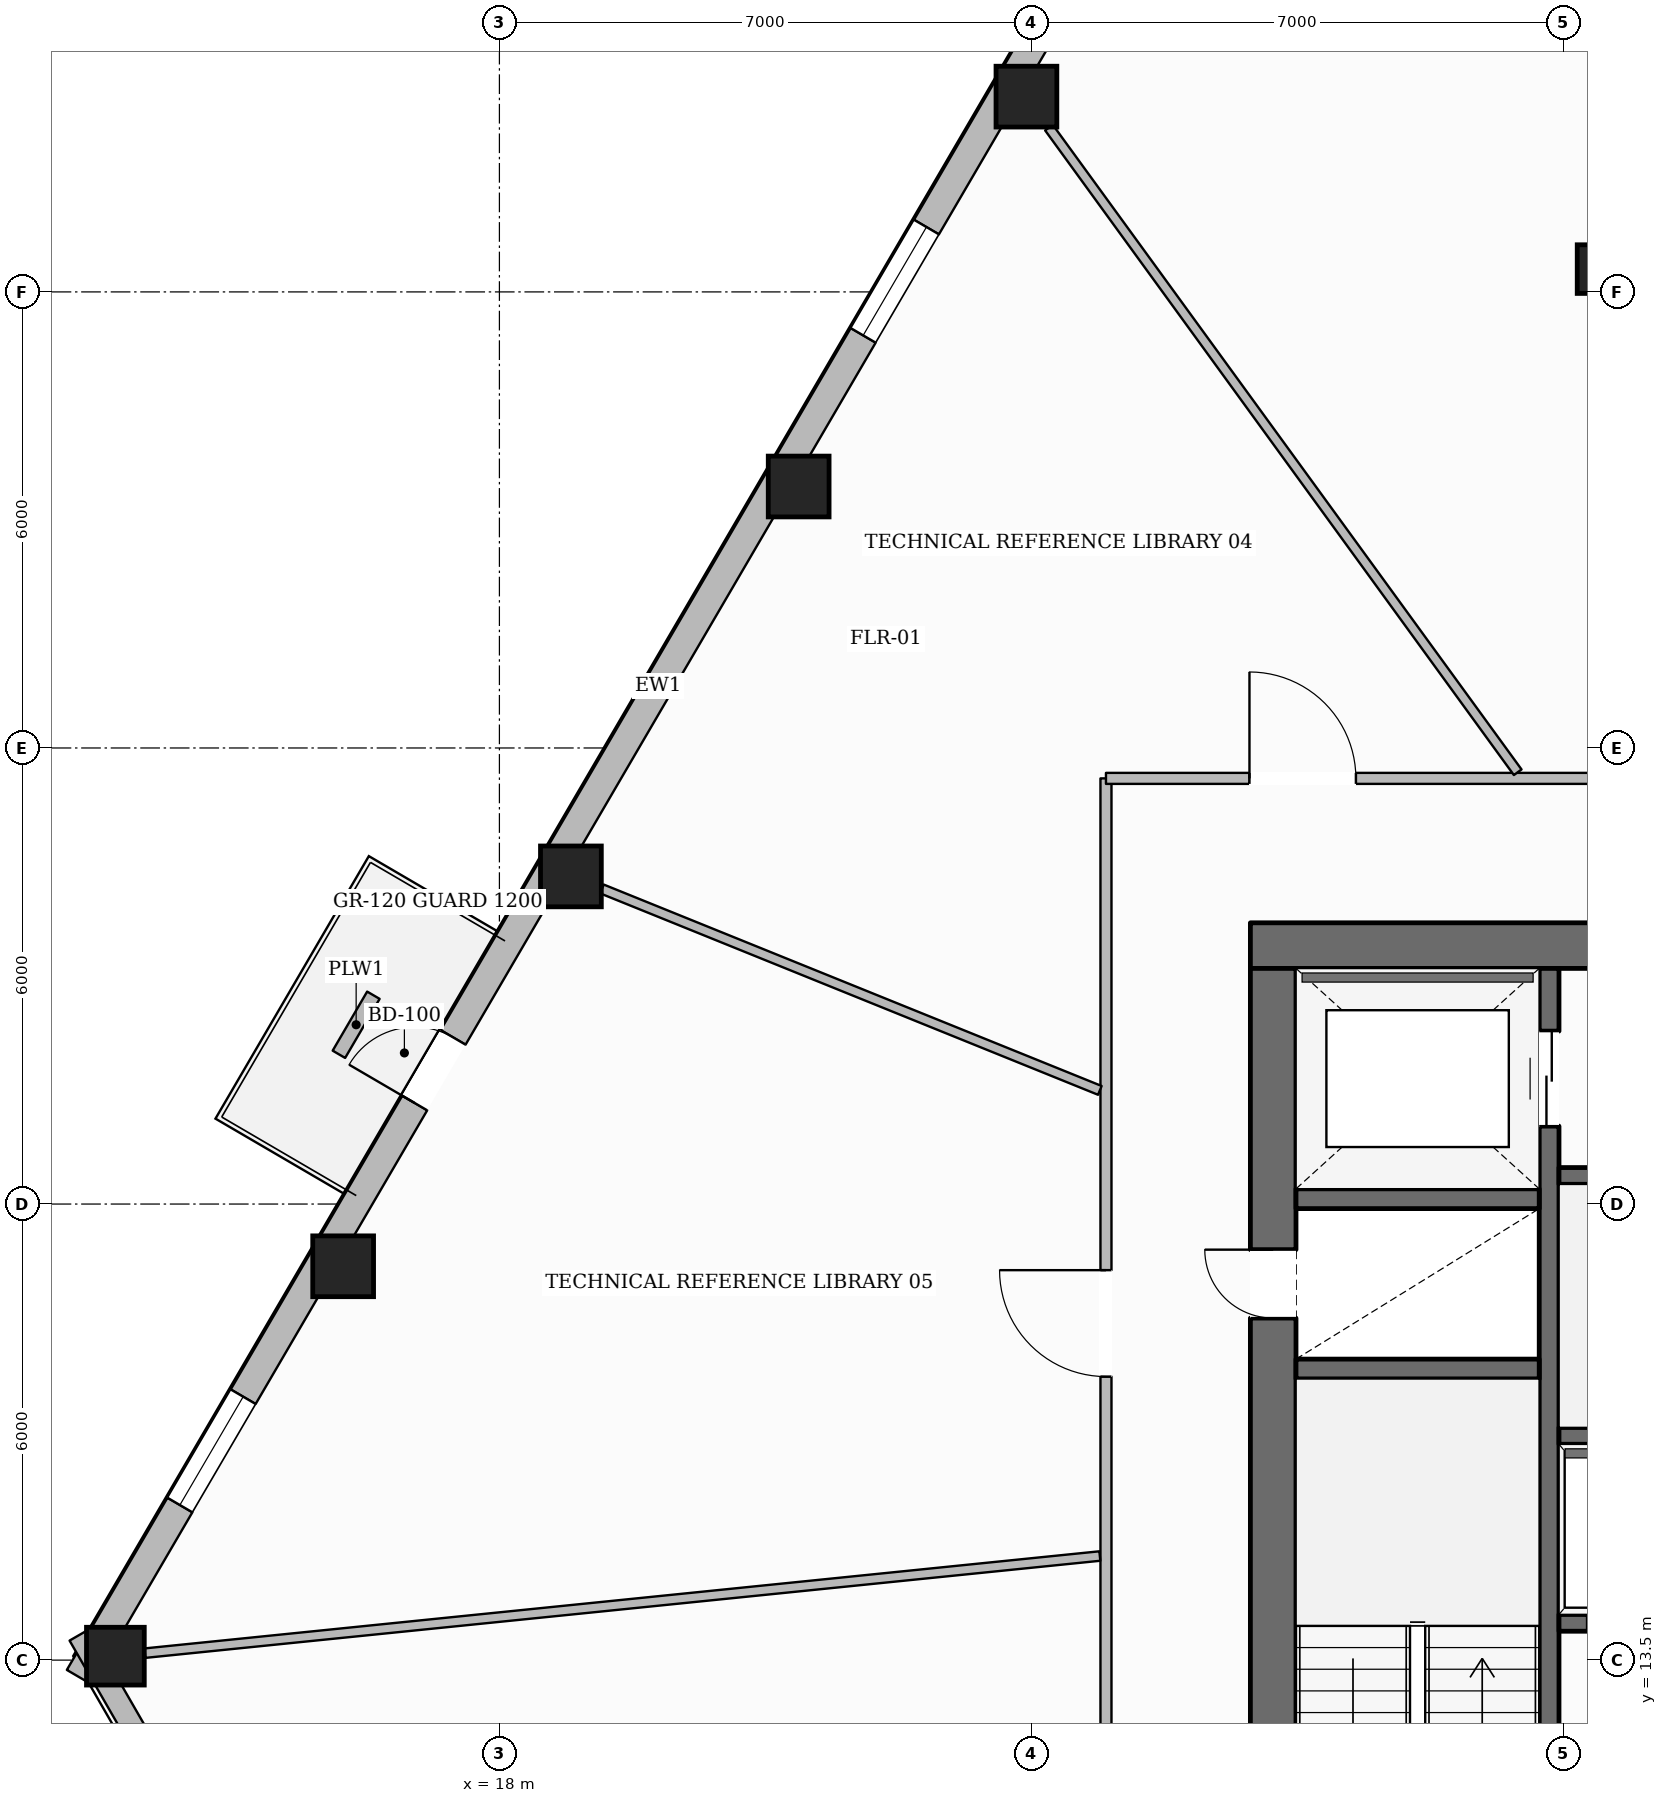
"""IFC4 building model, lengths in metres.
Left out: names, types, materials, properties, quantities, classifications, styles, units other than length and angle.
Written with IfcOpenShell. Run it as: python <this file> out.ifc"""

import sys

from ifc_helpers import new_model, si_unit, direction, frame, frame_2d, origin, origin_2d, place, context, subcontext, project, spatial, rectangle, hollow_rectangle, extrude, element, fill, save


model = new_model("IFC4")
c1 = context("Model", 3, precision=1e-05, world=origin(), true_north=direction((0.0, 1.0)))
c2 = subcontext(c1, "Body", "Model", "MODEL_VIEW")
j1 = project(units=[si_unit("LENGTHUNIT", "METRE"), si_unit("PLANEANGLEUNIT", "RADIAN")], contexts=[c1])
p1 = place(None, origin())
s1 = spatial("IfcSite", under=j1, at=p1, CompositionType="ELEMENT")
p2 = place(p1, origin())
s2 = spatial("IfcBuilding", under=s1, at=p2, CompositionType="ELEMENT")
p3 = place(p2, frame((0.0, 0.0, 71.45)))
s3 = spatial("IfcBuildingStorey", under=s2, at=p3, CompositionType="ELEMENT", Elevation=71.45)
p4 = place(p3, frame((27.88, 22.9, 0.0), z_axis=(0.0, 0.0, 1.0), x_axis=(1.0, 0.0, 0.0)))
e1 = element("IfcWall", 1, at=p4, inside=s3, PredefinedType="SOLIDWALL", context=c2, shape_type="SweptSolid", body=[
    extrude(rectangle(XDim=20.24, YDim=0.6, at=frame_2d((10.12, 0.0))), origin(), (0.0, 0.0, 1.0), 3.43),
])
p5 = place(p4, frame((6.395, 0.0, 0.0)))
e2 = element("IfcOpeningElement", 2, at=p5, cuts=e1, PredefinedType="OPENING", context=c2, shape_type="SweptSolid", body=[
    extrude(rectangle(XDim=1.05, YDim=2.15, at=frame_2d((0.525, 1.075))), frame((0.0, 0.31, 0.0), z_axis=(0.0, -1.0, 0.0), x_axis=(1.0, 0.0, 0.0)), (0.0, 0.0, 1.0), 0.62),
])
p6 = place(p4, frame((12.795, 0.0, 0.0)))
e3 = element("IfcOpeningElement", 3, at=p6, cuts=e1, PredefinedType="OPENING", context=c2, shape_type="SweptSolid", body=[
    extrude(rectangle(XDim=1.05, YDim=2.15, at=frame_2d((0.525, 1.075))), frame((0.0, 0.31, 0.0), z_axis=(0.0, -1.0, 0.0), x_axis=(1.0, 0.0, 0.0)), (0.0, 0.0, 1.0), 0.62),
])
p7 = place(p3, frame((28.18, 9.6, 0.0), z_axis=(0.0, 0.0, 1.0), x_axis=(0.0, 1.0, 0.0)))
e4 = element("IfcWall", 4, at=p7, inside=s3, PredefinedType="SOLIDWALL", context=c2, shape_type="SweptSolid", body=[
    extrude(rectangle(XDim=13.0, YDim=0.6, at=frame_2d((6.5, 0.0))), origin(), (0.0, 0.0, 1.0), 3.43),
])
p8 = place(p7, frame((0.2, 0.0, 0.0)))
e5 = element("IfcOpeningElement", 5, at=p8, cuts=e4, PredefinedType="OPENING", context=c2, shape_type="SweptSolid", body=[
    extrude(rectangle(XDim=1.1, YDim=2.15, at=frame_2d((0.55, 1.075))), frame((0.0, 0.31, 0.0), z_axis=(0.0, -1.0, 0.0), x_axis=(1.0, 0.0, 0.0)), (0.0, 0.0, 1.0), 0.62),
])
p9 = place(p7, frame((8.4, 0.0, 0.0)))
e6 = element("IfcOpeningElement", 6, at=p9, cuts=e4, PredefinedType="OPENING", context=c2, shape_type="SweptSolid", body=[
    extrude(rectangle(XDim=0.9, YDim=2.1, at=frame_2d((0.45, 1.05))), frame((0.0, 0.31, 0.0), z_axis=(0.0, -1.0, 0.0), x_axis=(1.0, 0.0, 0.0)), (0.0, 0.0, 1.0), 0.62),
])
p10 = place(p3, frame((31.81, 9.6, 0.0), z_axis=(0.0, 0.0, 1.0), x_axis=(0.0, 1.0, 0.0)))
e7 = element("IfcWall", 7, at=p10, inside=s3, PredefinedType="SHEAR", context=c2, shape_type="SweptSolid", body=[
    extrude(rectangle(XDim=13.0, YDim=0.26, at=frame_2d((6.5, 0.0))), origin(), (0.0, 0.0, 1.0), 3.43),
])
p11 = place(p10, frame((10.925, 0.0, 0.0)))
e8 = element("IfcOpeningElement", 8, at=p11, cuts=e7, PredefinedType="OPENING", context=c2, shape_type="SweptSolid", body=[
    extrude(rectangle(XDim=1.25, YDim=2.25, at=frame_2d((0.625, 1.125))), frame((0.0, 0.14, 0.0), z_axis=(0.0, -1.0, 0.0), x_axis=(1.0, 0.0, 0.0)), (0.0, 0.0, 1.0), 0.28),
])
for number, where, z_axis, x_axis in (
    (9, (28.48, 17.33, 0.0), (0.0, 0.0, 1.0), (1.0, 0.0, 0.0)),
    (10, (28.48, 19.57, 0.0), (0.0, 0.0, 1.0), (1.0, 0.0, 0.0)),
):
    element("IfcWall", number, at=place(p3, frame(where, z_axis=z_axis, x_axis=x_axis)), inside=s3, PredefinedType="SHEAR", context=c2, shape_type="SweptSolid", body=[
        extrude(rectangle(XDim=3.2, YDim=0.26, at=frame_2d((1.6, 0.0))), origin(), (0.0, 0.0, 1.0), 3.43),
    ])
p12 = place(p3, frame((31.94, 19.87, 0.0), z_axis=(0.0, 0.0, 1.0), x_axis=(1.0, 0.0, 0.0)))
e11 = element("IfcWall", 11, at=p12, inside=s3, PredefinedType="SOLIDWALL", context=c2, shape_type="SweptSolid", body=[
    extrude(rectangle(XDim=12.12, YDim=0.22, at=frame_2d((6.06, 0.0))), origin(), (0.0, 0.0, 1.0), 3.43),
])
p13 = place(p12, frame((6.3, 0.0, 0.0)))
e12 = element("IfcOpeningElement", 12, at=p13, cuts=e11, PredefinedType="OPENING", context=c2, shape_type="SweptSolid", body=[
    extrude(rectangle(XDim=1.1, YDim=2.15, at=frame_2d((0.55, 1.075))), frame((0.0, 0.12, 0.0), z_axis=(0.0, -1.0, 0.0), x_axis=(1.0, 0.0, 0.0)), (0.0, 0.0, 1.0), 0.24),
])
p14 = place(p12, frame((8.61, 0.0, 0.0)))
e13 = element("IfcOpeningElement", 13, at=p14, cuts=e11, PredefinedType="OPENING", context=c2, shape_type="SweptSolid", body=[
    extrude(rectangle(XDim=0.9, YDim=2.1, at=frame_2d((0.45, 1.05))), frame((0.0, 0.12, 0.0), z_axis=(0.0, -1.0, 0.0), x_axis=(1.0, 0.0, 0.0)), (0.0, 0.0, 1.0), 0.24),
])
p15 = place(p12, frame((10.85, 0.0, 0.0)))
e14 = element("IfcOpeningElement", 14, at=p15, cuts=e11, PredefinedType="OPENING", context=c2, shape_type="SweptSolid", body=[
    extrude(rectangle(XDim=0.9, YDim=2.1, at=frame_2d((0.45, 1.05))), frame((0.0, 0.12, 0.0), z_axis=(0.0, -1.0, 0.0), x_axis=(1.0, 0.0, 0.0)), (0.0, 0.0, 1.0), 0.24),
])
p16 = place(p3, frame((31.94, 16.45, 0.0), z_axis=(0.0, 0.0, 1.0), x_axis=(1.0, 0.0, 0.0)))
e15 = element("IfcWall", 15, at=p16, inside=s3, PredefinedType="SOLIDWALL", context=c2, shape_type="SweptSolid", body=[
    extrude(rectangle(XDim=12.12, YDim=0.22, at=frame_2d((6.06, 0.0))), origin(), (0.0, 0.0, 1.0), 3.43),
])
p17 = place(p3, frame((31.94, 13.99, 0.0), z_axis=(0.0, 0.0, 1.0), x_axis=(1.0, 0.0, 0.0)))
e16 = element("IfcWall", 16, at=p17, inside=s3, PredefinedType="SOLIDWALL", context=c2, shape_type="SweptSolid", body=[
    extrude(rectangle(XDim=12.12, YDim=0.22, at=frame_2d((6.06, 0.0))), origin(), (0.0, 0.0, 1.0), 3.43),
])
p18 = place(p17, frame((0.385, 0.0, 0.0)))
e17 = element("IfcOpeningElement", 17, at=p18, cuts=e16, PredefinedType="OPENING", context=c2, shape_type="SweptSolid", body=[
    extrude(rectangle(XDim=1.1, YDim=2.2, at=frame_2d((0.55, 1.1))), frame((0.0, 0.12, 0.0), z_axis=(0.0, -1.0, 0.0), x_axis=(1.0, 0.0, 0.0)), (0.0, 0.0, 1.0), 0.24),
])
p19 = place(p17, frame((2.435, 0.0, 0.0)))
e18 = element("IfcOpeningElement", 18, at=p19, cuts=e16, PredefinedType="OPENING", context=c2, shape_type="SweptSolid", body=[
    extrude(rectangle(XDim=1.1, YDim=2.2, at=frame_2d((0.55, 1.1))), frame((0.0, 0.12, 0.0), z_axis=(0.0, -1.0, 0.0), x_axis=(1.0, 0.0, 0.0)), (0.0, 0.0, 1.0), 0.24),
])
p20 = place(p17, frame((4.485, 0.0, 0.0)))
e19 = element("IfcOpeningElement", 19, at=p20, cuts=e16, PredefinedType="OPENING", context=c2, shape_type="SweptSolid", body=[
    extrude(rectangle(XDim=1.1, YDim=2.2, at=frame_2d((0.55, 1.1))), frame((0.0, 0.12, 0.0), z_axis=(0.0, -1.0, 0.0), x_axis=(1.0, 0.0, 0.0)), (0.0, 0.0, 1.0), 0.24),
])
for number, where, z_axis, x_axis in (
    (20, (24.934, 34.069, 0.0), (0.0, 0.0, 1.0), (1.0, 0.0, 0.0)),
    (21, (21.937, 28.94, 0.0), (0.0, 0.0, 1.0), (1.0, 0.0, 0.0)),
    (22, (18.941, 23.811, 0.0), (0.0, 0.0, 1.0), (1.0, 0.0, 0.0)),
    (23, (15.944, 18.681, 0.0), (0.0, 0.0, 1.0), (1.0, 0.0, 0.0)),
):
    element("IfcColumn", number, at=place(p3, frame(where, z_axis=z_axis, x_axis=x_axis)), inside=s3, PredefinedType="COLUMN", context=c2, shape_type="SweptSolid", body=[
        extrude(hollow_rectangle(XDim=0.8, YDim=0.8, WallThickness=0.036, at=origin_2d()), origin(), (0.0, 0.0, 1.0), 3.43),
    ])
p21 = place(p3, frame((12.948, 13.552, 0.0), z_axis=(0.0, 0.0, 1.0), x_axis=(1.0, 0.0, 0.0)))
e24 = element("IfcColumn", 24, at=p21, inside=s3, PredefinedType="COLUMN", context=c2, shape_type="SweptSolid", body=[
    extrude(hollow_rectangle(XDim=0.76, YDim=0.76, WallThickness=0.035, at=origin_2d()), origin(), (0.0, 0.0, 1.0), 3.43),
])
p22 = place(p3, frame((32.5, 31.8, 0.0), z_axis=(0.0, 0.0, 1.0), x_axis=(1.0, 0.0, 0.0)))
e25 = element("IfcColumn", 25, at=p22, inside=s3, PredefinedType="COLUMN", context=c2, shape_type="SweptSolid", body=[
    extrude(hollow_rectangle(XDim=0.64, YDim=0.64, WallThickness=0.028, at=origin_2d()), origin(), (0.0, 0.0, 1.0), 3.43),
])
p23 = place(p3, frame((12.473, 13.275, 0.0), z_axis=(0.0, 0.0, 1.0), x_axis=(0.504426765764, 0.863454479391, 0.0)))
e26 = element("IfcWall", 26, at=p23, inside=s3, PredefinedType="STANDARD", context=c2, shape_type="SweptSolid", body=[
    extrude(rectangle(XDim=36.594, YDim=0.38, at=frame_2d((18.297, 0.0))), origin(), (0.0, 0.0, 1.0), 2.81),
])
p24 = place(p23, frame((8.749, 0.0, 0.0)))
e27 = element("IfcOpeningElement", 27, at=p24, cuts=e26, PredefinedType="OPENING", context=c2, shape_type="SweptSolid", body=[
    extrude(rectangle(XDim=1.0, YDim=2.2, at=frame_2d((0.5, 1.1))), frame((0.0, 0.2, 0.0), z_axis=(0.0, -1.0, 0.0), x_axis=(1.0, 0.0, 0.0)), (0.0, 0.0, 1.0), 0.4),
])
p25 = place(p23, frame((32.326, 0.0, 0.55)))
e28 = element("IfcOpeningElement", 28, at=p25, cuts=e26, PredefinedType="OPENING", context=c2, shape_type="SweptSolid", body=[
    extrude(rectangle(XDim=1.65, YDim=1.6, at=frame_2d((0.825, 0.8))), frame((0.0, 0.2, 0.0), z_axis=(0.0, -1.0, 0.0), x_axis=(1.0, 0.0, 0.0)), (0.0, 0.0, 1.0), 0.4),
])
p26 = place(p23, frame((26.385, 0.0, 0.55)))
e29 = element("IfcOpeningElement", 29, at=p26, cuts=e26, PredefinedType="OPENING", context=c2, shape_type="SweptSolid", body=[
    extrude(rectangle(XDim=1.65, YDim=1.6, at=frame_2d((0.825, 0.8))), frame((0.0, 0.2, 0.0), z_axis=(0.0, -1.0, 0.0), x_axis=(1.0, 0.0, 0.0)), (0.0, 0.0, 1.0), 0.4),
])
p27 = place(p23, frame((20.445, 0.0, 0.55)))
e30 = element("IfcOpeningElement", 30, at=p27, cuts=e26, PredefinedType="OPENING", context=c2, shape_type="SweptSolid", body=[
    extrude(rectangle(XDim=1.65, YDim=1.6, at=frame_2d((0.825, 0.8))), frame((0.0, 0.2, 0.0), z_axis=(0.0, -1.0, 0.0), x_axis=(1.0, 0.0, 0.0)), (0.0, 0.0, 1.0), 0.4),
])
p28 = place(p23, frame((2.624, 0.0, 0.55)))
e31 = element("IfcOpeningElement", 31, at=p28, cuts=e26, PredefinedType="OPENING", context=c2, shape_type="SweptSolid", body=[
    extrude(rectangle(XDim=1.65, YDim=1.6, at=frame_2d((0.825, 0.8))), frame((0.0, 0.2, 0.0), z_axis=(0.0, -1.0, 0.0), x_axis=(1.0, 0.0, 0.0)), (0.0, 0.0, 1.0), 0.4),
])
p29 = place(p3, frame((19.874, 0.99, 0.0), z_axis=(0.0, 0.0, 1.0), x_axis=(-0.499265087694, 0.86644929004, 0.0)))
e32 = element("IfcWall", 32, at=p29, inside=s3, PredefinedType="STANDARD", context=c2, shape_type="SweptSolid", body=[
    extrude(rectangle(XDim=14.821, YDim=0.3, at=frame_2d((7.41, 0.0))), origin(), (0.0, 0.0, 1.0), 2.81),
])
p30 = place(p29, frame((6.81, 0.0, 0.65)))
e33 = element("IfcOpeningElement", 33, at=p30, cuts=e32, PredefinedType="OPENING", context=c2, shape_type="SweptSolid", body=[
    extrude(rectangle(XDim=1.2, YDim=1.55, at=frame_2d((0.6, 0.775))), frame((0.0, 0.16, 0.0), z_axis=(0.0, -1.0, 0.0), x_axis=(1.0, 0.0, 0.0)), (0.0, 0.0, 1.0), 0.32),
])
p31 = place(p3, frame((16.342, 22.247, 0.0), z_axis=(0.0, 0.0, 1.0), x_axis=(-0.504410493852, -0.863463985174, 0.0)))
e34 = element("IfcWall", 34, at=p31, inside=s3, PredefinedType="USERDEFINED", context=c2, shape_type="SweptSolid", body=[
    extrude(rectangle(XDim=0.9, YDim=0.19, at=frame_2d((0.45, 0.0))), origin(), (0.0, 0.0, 1.0), 0.5),
])
p32 = place(p3, frame((25.98, 9.1, 0.0), z_axis=(0.0, 0.0, 1.0), x_axis=(0.0, 1.0, 0.0)))
e35 = element("IfcWall", 35, at=p32, inside=s3, PredefinedType="PARTITIONING", context=c2, shape_type="SweptSolid", body=[
    extrude(rectangle(XDim=16.0, YDim=0.145, at=frame_2d((8.0, 0.0))), origin(), (0.0, 0.0, 1.0), 3.118),
])
p33 = place(p32, frame((8.13, 0.0, 0.0)))
e36 = element("IfcOpeningElement", 36, at=p33, cuts=e35, PredefinedType="OPENING", context=c2, shape_type="SweptSolid", body=[
    extrude(rectangle(XDim=1.4, YDim=2.2, at=frame_2d((0.7, 1.1))), frame((0.0, 0.083, 0.0), z_axis=(0.0, -1.0, 0.0), x_axis=(1.0, 0.0, 0.0)), (0.0, 0.0, 1.0), 0.165),
])
p34 = place(p3, frame((25.98, 25.1, 0.0), z_axis=(0.0, 0.0, 1.0), x_axis=(1.0, 0.0, 0.0)))
e37 = element("IfcWall", 37, at=p34, inside=s3, PredefinedType="PARTITIONING", context=c2, shape_type="SweptSolid", body=[
    extrude(rectangle(XDim=11.02, YDim=0.145, at=frame_2d((5.51, 0.0))), origin(), (0.0, 0.0, 1.0), 3.43),
])
p35 = place(p34, frame((1.888, 0.0, 0.0)))
e38 = element("IfcOpeningElement", 38, at=p35, cuts=e37, PredefinedType="OPENING", context=c2, shape_type="SweptSolid", body=[
    extrude(rectangle(XDim=1.4, YDim=2.2, at=frame_2d((0.7, 1.1))), frame((0.0, 0.083, 0.0), z_axis=(0.0, -1.0, 0.0), x_axis=(1.0, 0.0, 0.0)), (0.0, 0.0, 1.0), 0.165),
])
p36 = place(p3, frame((31.397, 25.18, 0.0), z_axis=(0.0, 0.0, 1.0), x_axis=(-0.588106629078, 0.808783402917, 0.0)))
e39 = element("IfcWall", 39, at=p36, inside=s3, PredefinedType="PARTITIONING", context=c2, shape_type="SweptSolid", body=[
    extrude(rectangle(XDim=10.486, YDim=0.125, at=frame_2d((5.243, 0.0))), origin(), (0.0, 0.0, 1.0), 2.897),
])
p37 = place(p3, frame((25.899, 20.995, 0.0), z_axis=(0.0, 0.0, 1.0), x_axis=(-0.927013742052, 0.375027361731, 0.0)))
e40 = element("IfcWall", 40, at=p37, inside=s3, PredefinedType="PARTITIONING", context=c2, shape_type="SweptSolid", body=[
    extrude(rectangle(XDim=7.067, YDim=0.125, at=frame_2d((3.533, 0.0))), origin(), (0.0, 0.0, 1.0), 2.897),
])
p38 = place(p3, frame((25.899, 14.869, 0.0), z_axis=(0.0, 0.0, 1.0), x_axis=(-0.99486751796, -0.101186074678, 0.0)))
e41 = element("IfcWall", 41, at=p38, inside=s3, PredefinedType="PARTITIONING", context=c2, shape_type="SweptSolid", body=[
    extrude(rectangle(XDim=12.628, YDim=0.125, at=frame_2d((6.314, 0.0))), origin(), (0.0, 0.0, 1.0), 2.897),
])
p39 = place(p24, origin())
e42 = element("IfcDoor", 42, at=p39, inside=s3, OperationType="SINGLE_SWING_LEFT", PredefinedType="DOOR", context=c2, shape_type="SweptSolid", body=[
    extrude(rectangle(XDim=1.0, YDim=2.2, at=frame_2d((0.5, 1.1))), frame((0.0, 0.025, 0.0), z_axis=(0.0, -1.0, 0.0), x_axis=(1.0, 0.0, 0.0)), (0.0, 0.0, 1.0), 0.05),
])
fill(e27, e42)
p40 = place(p27, origin())
e43 = element("IfcWindow", 43, at=p40, inside=s3, PartitioningType="SINGLE_PANEL", PredefinedType="WINDOW", context=c2, shape_type="SweptSolid", body=[
    extrude(rectangle(XDim=1.65, YDim=1.6, at=frame_2d((0.825, 0.8))), frame((0.0, 0.03, 0.0), z_axis=(0.0, -1.0, 0.0), x_axis=(1.0, 0.0, 0.0)), (0.0, 0.0, 1.0), 0.06),
])
fill(e30, e43)
p41 = place(p28, origin())
e44 = element("IfcWindow", 44, at=p41, inside=s3, PartitioningType="SINGLE_PANEL", PredefinedType="WINDOW", context=c2, shape_type="SweptSolid", body=[
    extrude(rectangle(XDim=1.65, YDim=1.6, at=frame_2d((0.825, 0.8))), frame((0.0, 0.03, 0.0), z_axis=(0.0, -1.0, 0.0), x_axis=(1.0, 0.0, 0.0)), (0.0, 0.0, 1.0), 0.06),
])
fill(e31, e44)
p42 = place(p9, origin())
e45 = element("IfcDoor", 45, at=p42, inside=s3, OperationType="SINGLE_SWING_RIGHT", PredefinedType="DOOR", context=c2, shape_type="SweptSolid", body=[
    extrude(rectangle(XDim=0.9, YDim=2.1, at=frame_2d((0.45, 1.05))), frame((0.0, 0.025, 0.0), z_axis=(0.0, -1.0, 0.0), x_axis=(1.0, 0.0, 0.0)), (0.0, 0.0, 1.0), 0.05),
])
fill(e6, e45)
p43 = place(p11, origin())
e46 = element("IfcDoor", 46, at=p43, inside=s3, OperationType="DOUBLE_DOOR_SLIDING", PredefinedType="DOOR", context=c2, shape_type="SweptSolid", body=[
    extrude(rectangle(XDim=1.25, YDim=2.25, at=frame_2d((0.625, 1.125))), frame((0.0, 0.025, 0.0), z_axis=(0.0, -1.0, 0.0), x_axis=(1.0, 0.0, 0.0)), (0.0, 0.0, 1.0), 0.05),
])
fill(e8, e46)
p44 = place(p35, origin())
e47 = element("IfcDoor", 47, at=p44, inside=s3, OperationType="SINGLE_SWING_LEFT", PredefinedType="DOOR", context=c2, shape_type="SweptSolid", body=[
    extrude(rectangle(XDim=1.4, YDim=2.2, at=frame_2d((0.7, 1.1))), frame((0.0, 0.025, 0.0), z_axis=(0.0, -1.0, 0.0), x_axis=(1.0, 0.0, 0.0)), (0.0, 0.0, 1.0), 0.05),
])
fill(e38, e47)
p45 = place(p33, origin())
e48 = element("IfcDoor", 48, at=p45, inside=s3, OperationType="SINGLE_SWING_RIGHT", PredefinedType="DOOR", context=c2, shape_type="SweptSolid", body=[
    extrude(rectangle(XDim=1.4, YDim=2.2, at=frame_2d((0.7, 1.1))), frame((0.0, 0.025, 0.0), z_axis=(0.0, -1.0, 0.0), x_axis=(1.0, 0.0, 0.0)), (0.0, 0.0, 1.0), 0.05),
])
fill(e36, e48)
save(model, sys.argv[1])
